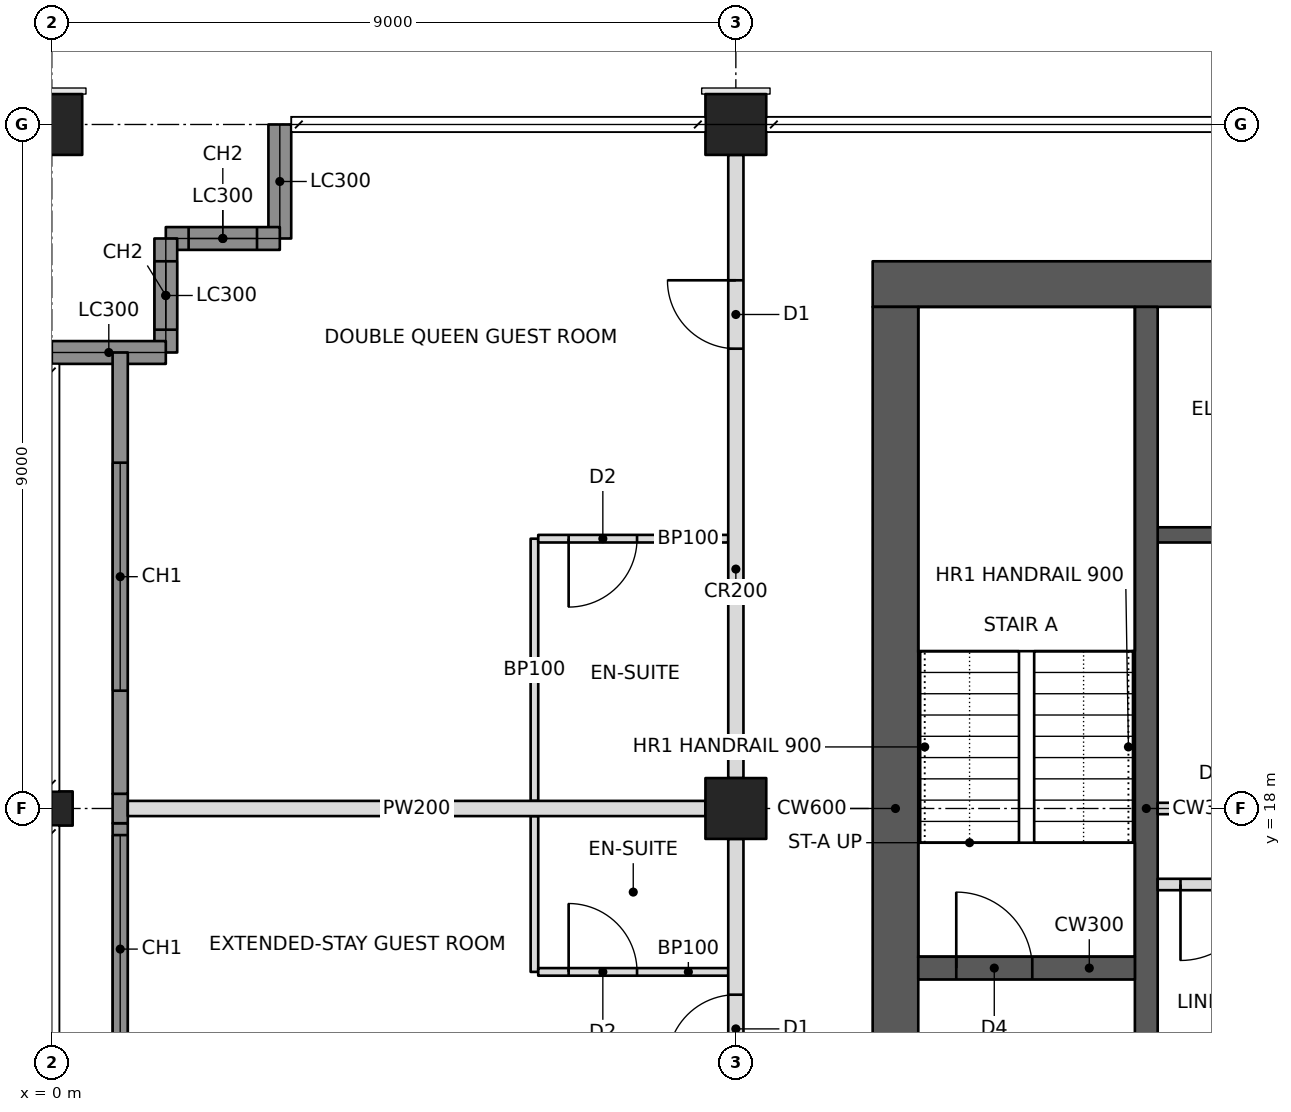
"""IFC4 building model, lengths in metres.
Left out: names, types, materials, properties, quantities, classifications, styles, units other than length and angle.
Written with IfcOpenShell. Run it as: python <this file> out.ifc"""

import sys

from ifc_helpers import new_model, si_unit, direction, frame, frame_2d, origin, origin_2d, place, context, subcontext, project, spatial, rectangle, hollow_rectangle, i_section, extrude, element, fill, save


model = new_model("IFC4")
c1 = context("Model", 3, precision=1e-05, world=origin(), true_north=direction((0.0, 1.0)))
c2 = subcontext(c1, "Body", "Model", "MODEL_VIEW")
j1 = project(units=[si_unit("LENGTHUNIT", "METRE"), si_unit("PLANEANGLEUNIT", "RADIAN")], contexts=[c1])
p1 = place(None, origin())
s1 = spatial("IfcSite", under=j1, at=p1, CompositionType="ELEMENT")
p2 = place(p1, origin())
s2 = spatial("IfcBuilding", under=s1, at=p2, CompositionType="ELEMENT")
p3 = place(p2, frame((0.0, 0.0, 167.2)))
s3 = spatial("IfcBuildingStorey", under=s2, at=p3, CompositionType="ELEMENT", Elevation=167.2)
p4 = place(p3, frame((0.0, 18.0, 0.0), z_axis=(0.0, 0.0, 1.0), x_axis=(0.0, 1.0, 0.0)))
e1 = element("IfcColumn", 1, at=p4, inside=s3, PredefinedType="COLUMN", context=c2, shape_type="SweptSolid", body=[
    extrude(i_section(OverallWidth=0.449, OverallDepth=0.549, WebThickness=0.072, FlangeThickness=0.115, at=origin_2d()), origin(), (0.0, 0.0, 1.0), 3.4),
])
p5 = place(p3, frame((0.0, 27.0, 0.0), z_axis=(0.0, 0.0, 1.0), x_axis=(0.0, 1.0, 0.0)))
e2 = element("IfcColumn", 2, at=p5, inside=s3, PredefinedType="COLUMN", context=c2, shape_type="SweptSolid", body=[
    extrude(hollow_rectangle(XDim=0.8, YDim=0.8, WallThickness=0.07, at=origin_2d()), origin(), (0.0, 0.0, 1.0), 3.4),
])
p6 = place(p3, frame((9.0, 18.0, 0.0), z_axis=(0.0, 0.0, 1.0), x_axis=(1.0, 0.0, 0.0)))
e3 = element("IfcColumn", 3, at=p6, inside=s3, PredefinedType="COLUMN", context=c2, shape_type="SweptSolid", body=[
    extrude(hollow_rectangle(XDim=0.8, YDim=0.8, WallThickness=0.06, at=origin_2d()), origin(), (0.0, 0.0, 1.0), 3.4),
])
p7 = place(p3, frame((9.0, 27.0, 0.0), z_axis=(0.0, 0.0, 1.0), x_axis=(1.0, 0.0, 0.0)))
e4 = element("IfcColumn", 4, at=p7, inside=s3, PredefinedType="COLUMN", context=c2, shape_type="SweptSolid", body=[
    extrude(hollow_rectangle(XDim=0.8, YDim=0.8, WallThickness=0.07, at=origin_2d()), origin(), (0.0, 0.0, 1.0), 3.4),
])
p8 = place(p3, frame((10.8, 24.9, 0.0), z_axis=(0.0, 0.0, 1.0), x_axis=(1.0, 0.0, 0.0)))
e5 = element("IfcWall", 5, at=p8, inside=s3, PredefinedType="SHEAR", context=c2, shape_type="SweptSolid", body=[
    extrude(rectangle(XDim=23.4, YDim=0.6, at=frame_2d((11.7, 0.0))), origin(), (0.0, 0.0, 1.0), 3.4),
])
p9 = place(p8, frame((17.2, 0.0, 0.0)))
e6 = element("IfcOpeningElement", 6, at=p9, cuts=e5, PredefinedType="OPENING", context=c2, shape_type="SweptSolid", body=[
    extrude(rectangle(XDim=1.8, YDim=2.1, at=frame_2d((0.9, 1.05))), frame((0.0, 0.31, 0.0), z_axis=(0.0, -1.0, 0.0), x_axis=(1.0, 0.0, 0.0)), (0.0, 0.0, 1.0), 0.62),
])
p10 = place(p8, frame((21.1, 0.0, 0.0)))
e7 = element("IfcOpeningElement", 7, at=p10, cuts=e5, PredefinedType="OPENING", context=c2, shape_type="SweptSolid", body=[
    extrude(rectangle(XDim=1.0, YDim=2.1, at=frame_2d((0.5, 1.05))), frame((0.0, 0.31, 0.0), z_axis=(0.0, -1.0, 0.0), x_axis=(1.0, 0.0, 0.0)), (0.0, 0.0, 1.0), 0.62),
])
p11 = place(p8, frame((4.9, 0.0, 0.0)))
e8 = element("IfcOpeningElement", 8, at=p11, cuts=e5, PredefinedType="OPENING", context=c2, shape_type="SweptSolid", body=[
    extrude(rectangle(XDim=1.0, YDim=2.1, at=frame_2d((0.5, 1.05))), frame((0.0, 0.31, 0.0), z_axis=(0.0, -1.0, 0.0), x_axis=(1.0, 0.0, 0.0)), (0.0, 0.0, 1.0), 0.62),
])
p12 = place(p3, frame((11.1, 11.4, 0.0), z_axis=(0.0, 0.0, 1.0), x_axis=(0.0, 1.0, 0.0)))
e9 = element("IfcWall", 9, at=p12, inside=s3, PredefinedType="SHEAR", context=c2, shape_type="SweptSolid", body=[
    extrude(rectangle(XDim=13.2, YDim=0.6, at=frame_2d((6.6, 0.0))), origin(), (0.0, 0.0, 1.0), 3.4),
])
p13 = place(p3, frame((14.4, 11.4, 0.0), z_axis=(0.0, 0.0, 1.0), x_axis=(0.0, 1.0, 0.0)))
e10 = element("IfcWall", 10, at=p13, inside=s3, PredefinedType="SHEAR", context=c2, shape_type="SweptSolid", body=[
    extrude(rectangle(XDim=13.2, YDim=0.3, at=frame_2d((6.6, 0.0))), origin(), (0.0, 0.0, 1.0), 3.4),
])
p14 = place(p3, frame((11.4, 15.9, 0.0), z_axis=(0.0, 0.0, 1.0), x_axis=(1.0, 0.0, 0.0)))
e11 = element("IfcWall", 11, at=p14, inside=s3, PredefinedType="SHEAR", context=c2, shape_type="SweptSolid", body=[
    extrude(rectangle(XDim=2.85, YDim=0.3, at=frame_2d((1.425, 0.0))), origin(), (0.0, 0.0, 1.0), 3.4),
])
p15 = place(p14, frame((0.5, 0.0, 0.0)))
e12 = element("IfcOpeningElement", 12, at=p15, cuts=e11, PredefinedType="OPENING", context=c2, shape_type="SweptSolid", body=[
    extrude(rectangle(XDim=1.0, YDim=2.1, at=frame_2d((0.5, 1.05))), frame((0.0, 0.16, 0.0), z_axis=(0.0, -1.0, 0.0), x_axis=(1.0, 0.0, 0.0)), (0.0, 0.0, 1.0), 0.32),
])
p16 = place(p3, frame((14.55, 18.0, 0.0), z_axis=(0.0, 0.0, 1.0), x_axis=(1.0, 0.0, 0.0)))
e13 = element("IfcWall", 13, at=p16, inside=s3, PredefinedType="PARTITIONING", context=c2, shape_type="SweptSolid", body=[
    extrude(rectangle(XDim=3.3, YDim=0.15, at=frame_2d((1.65, 0.0))), origin(), (0.0, 0.0, 1.0), 3.2),
])
p17 = place(p3, frame((14.55, 21.6, 0.0), z_axis=(0.0, 0.0, 1.0), x_axis=(1.0, 0.0, 0.0)))
e14 = element("IfcWall", 14, at=p17, inside=s3, PredefinedType="SHEAR", context=c2, shape_type="SweptSolid", body=[
    extrude(rectangle(XDim=3.3, YDim=0.2, at=frame_2d((1.65, 0.0))), origin(), (0.0, 0.0, 1.0), 3.4),
])
p18 = place(p3, frame((3.0, 27.0, 0.0), z_axis=(0.0, 0.0, 1.0), x_axis=(0.0, -1.0, 0.0)))
e15 = element("IfcWall", 15, at=p18, inside=s3, PredefinedType="SOLIDWALL", context=c2, shape_type="SweptSolid", body=[
    extrude(rectangle(XDim=1.5, YDim=0.3, at=frame_2d((0.75, 0.0))), origin(), (0.0, 0.0, 1.0), 2.42),
])
p19 = place(p3, frame((3.0, 25.5, 0.0), z_axis=(0.0, 0.0, 1.0), x_axis=(-1.0, 0.0, 0.0)))
e16 = element("IfcWall", 16, at=p19, inside=s3, PredefinedType="SOLIDWALL", context=c2, shape_type="SweptSolid", body=[
    extrude(rectangle(XDim=1.5, YDim=0.3, at=frame_2d((0.75, 0.0))), origin(), (0.0, 0.0, 1.0), 3.2),
])
p20 = place(p19, frame((0.3, 0.0, 0.6)))
e17 = element("IfcOpeningElement", 17, at=p20, cuts=e16, PredefinedType="OPENING", context=c2, shape_type="SweptSolid", body=[
    extrude(rectangle(XDim=0.9, YDim=2.2, at=frame_2d((0.45, 1.1))), frame((0.0, 0.16, 0.0), z_axis=(0.0, -1.0, 0.0), x_axis=(1.0, 0.0, 0.0)), (0.0, 0.0, 1.0), 0.32),
])
p21 = place(p3, frame((1.5, 25.5, 0.0), z_axis=(0.0, 0.0, 1.0), x_axis=(0.0, -1.0, 0.0)))
e18 = element("IfcWall", 18, at=p21, inside=s3, PredefinedType="SOLIDWALL", context=c2, shape_type="SweptSolid", body=[
    extrude(rectangle(XDim=1.5, YDim=0.3, at=frame_2d((0.75, 0.0))), origin(), (0.0, 0.0, 1.0), 3.2),
])
p22 = place(p21, frame((0.3, 0.0, 0.6)))
e19 = element("IfcOpeningElement", 19, at=p22, cuts=e18, PredefinedType="OPENING", context=c2, shape_type="SweptSolid", body=[
    extrude(rectangle(XDim=0.9, YDim=2.2, at=frame_2d((0.45, 1.1))), frame((0.0, 0.16, 0.0), z_axis=(0.0, -1.0, 0.0), x_axis=(1.0, 0.0, 0.0)), (0.0, 0.0, 1.0), 0.32),
])
p23 = place(p3, frame((1.5, 24.0, 0.0), z_axis=(0.0, 0.0, 1.0), x_axis=(-1.0, 0.0, 0.0)))
e20 = element("IfcWall", 20, at=p23, inside=s3, PredefinedType="SOLIDWALL", context=c2, shape_type="SweptSolid", body=[
    extrude(rectangle(XDim=1.5, YDim=0.3, at=frame_2d((0.75, 0.0))), origin(), (0.0, 0.0, 1.0), 2.42),
])
p24 = place(p3, frame((9.0, 10.8, 0.0), z_axis=(0.0, 0.0, 1.0), x_axis=(0.0, 1.0, 0.0)))
e21 = element("IfcWall", 21, at=p24, inside=s3, PredefinedType="PARTITIONING", context=c2, shape_type="SweptSolid", body=[
    extrude(rectangle(XDim=6.8, YDim=0.2, at=frame_2d((3.4, 0.0))), origin(), (0.0, 0.0, 1.0), 2.405),
])
p25 = place(p24, frame((0.25, 0.0, 0.0)))
e22 = element("IfcOpeningElement", 22, at=p25, cuts=e21, PredefinedType="OPENING", context=c2, shape_type="SweptSolid", body=[
    extrude(rectangle(XDim=0.9, YDim=2.1, at=frame_2d((0.45, 1.05))), frame((0.0, 0.11, 0.0), z_axis=(0.0, -1.0, 0.0), x_axis=(1.0, 0.0, 0.0)), (0.0, 0.0, 1.0), 0.22),
])
p26 = place(p24, frame((3.85, 0.0, 0.0)))
e23 = element("IfcOpeningElement", 23, at=p26, cuts=e21, PredefinedType="OPENING", context=c2, shape_type="SweptSolid", body=[
    extrude(rectangle(XDim=0.9, YDim=2.1, at=frame_2d((0.45, 1.05))), frame((0.0, 0.11, 0.0), z_axis=(0.0, -1.0, 0.0), x_axis=(1.0, 0.0, 0.0)), (0.0, 0.0, 1.0), 0.22),
])
p27 = place(p3, frame((9.0, 18.4, 0.0), z_axis=(0.0, 0.0, 1.0), x_axis=(0.0, 1.0, 0.0)))
e24 = element("IfcWall", 24, at=p27, inside=s3, PredefinedType="PARTITIONING", context=c2, shape_type="SweptSolid", body=[
    extrude(rectangle(XDim=8.2, YDim=0.2, at=frame_2d((4.1, 0.0))), origin(), (0.0, 0.0, 1.0), 2.405),
])
p28 = place(p27, frame((5.65, 0.0, 0.0)))
e25 = element("IfcOpeningElement", 25, at=p28, cuts=e24, PredefinedType="OPENING", context=c2, shape_type="SweptSolid", body=[
    extrude(rectangle(XDim=0.9, YDim=2.1, at=frame_2d((0.45, 1.05))), frame((0.0, 0.11, 0.0), z_axis=(0.0, -1.0, 0.0), x_axis=(1.0, 0.0, 0.0)), (0.0, 0.0, 1.0), 0.22),
])
p29 = place(p3, frame((8.6, 18.0, 0.0), z_axis=(0.0, 0.0, 1.0), x_axis=(-1.0, 0.0, 0.0)))
e26 = element("IfcWall", 26, at=p29, inside=s3, PredefinedType="PARTITIONING", context=c2, shape_type="SweptSolid", body=[
    extrude(rectangle(XDim=7.6, YDim=0.2, at=frame_2d((3.8, 0.0))), origin(), (0.0, 0.0, 1.0), 2.405),
])
p30 = place(p3, frame((6.35, 15.85, 0.0), z_axis=(0.0, 0.0, 1.0), x_axis=(0.0, 1.0, 0.0)))
e27 = element("IfcWall", 27, at=p30, inside=s3, PredefinedType="PARTITIONING", context=c2, shape_type="SweptSolid", body=[
    extrude(rectangle(XDim=2.05, YDim=0.1, at=frame_2d((1.025, 0.0))), origin(), (0.0, 0.0, 1.0), 2.404),
])
p31 = place(p3, frame((8.9, 15.85, 0.0), z_axis=(0.0, 0.0, 1.0), x_axis=(-1.0, 0.0, 0.0)))
e28 = element("IfcWall", 28, at=p31, inside=s3, PredefinedType="PARTITIONING", context=c2, shape_type="SweptSolid", body=[
    extrude(rectangle(XDim=2.5, YDim=0.1, at=frame_2d((1.25, 0.0))), origin(), (0.0, 0.0, 1.0), 2.404),
])
p32 = place(p31, frame((1.2, 0.0, 0.0)))
e29 = element("IfcOpeningElement", 29, at=p32, cuts=e28, PredefinedType="OPENING", context=c2, shape_type="SweptSolid", body=[
    extrude(rectangle(XDim=0.9, YDim=2.1, at=frame_2d((0.45, 1.05))), frame((0.0, 0.06, 0.0), z_axis=(0.0, -1.0, 0.0), x_axis=(1.0, 0.0, 0.0)), (0.0, 0.0, 1.0), 0.12),
])
p33 = place(p3, frame((6.35, 18.1, 0.0), z_axis=(0.0, 0.0, 1.0), x_axis=(0.0, 1.0, 0.0)))
e30 = element("IfcWall", 30, at=p33, inside=s3, PredefinedType="PARTITIONING", context=c2, shape_type="SweptSolid", body=[
    extrude(rectangle(XDim=3.45, YDim=0.1, at=frame_2d((1.725, 0.0))), origin(), (0.0, 0.0, 1.0), 2.404),
])
p34 = place(p3, frame((8.9, 21.55, 0.0), z_axis=(0.0, 0.0, 1.0), x_axis=(-1.0, 0.0, 0.0)))
e31 = element("IfcWall", 31, at=p34, inside=s3, PredefinedType="PARTITIONING", context=c2, shape_type="SweptSolid", body=[
    extrude(rectangle(XDim=2.5, YDim=0.1, at=frame_2d((1.25, 0.0))), origin(), (0.0, 0.0, 1.0), 2.404),
])
p35 = place(p34, frame((1.2, 0.0, 0.0)))
e32 = element("IfcOpeningElement", 32, at=p35, cuts=e31, PredefinedType="OPENING", context=c2, shape_type="SweptSolid", body=[
    extrude(rectangle(XDim=0.9, YDim=2.1, at=frame_2d((0.45, 1.05))), frame((0.0, 0.06, 0.0), z_axis=(0.0, -1.0, 0.0), x_axis=(1.0, 0.0, 0.0)), (0.0, 0.0, 1.0), 0.12),
])
p36 = place(p3, frame((14.55, 17.0, 0.0), z_axis=(0.0, 0.0, 1.0), x_axis=(1.0, 0.0, 0.0)))
e33 = element("IfcWall", 33, at=p36, inside=s3, PredefinedType="PARTITIONING", context=c2, shape_type="SweptSolid", body=[
    extrude(rectangle(XDim=3.3, YDim=0.15, at=frame_2d((1.65, 0.0))), origin(), (0.0, 0.0, 1.0), 3.2),
])
p37 = place(p36, frame((0.3, 0.0, 0.0)))
e34 = element("IfcOpeningElement", 34, at=p37, cuts=e33, PredefinedType="OPENING", context=c2, shape_type="SweptSolid", body=[
    extrude(rectangle(XDim=1.0, YDim=2.1, at=frame_2d((0.5, 1.05))), frame((0.0, 0.085, 0.0), z_axis=(0.0, -1.0, 0.0), x_axis=(1.0, 0.0, 0.0)), (0.0, 0.0, 1.0), 0.17),
])
p38 = place(p3, frame((0.9, 9.135, 0.0), z_axis=(0.0, 0.0, 1.0), x_axis=(0.0, 1.0, 0.0)))
e35 = element("IfcWall", 35, at=p38, inside=s3, PredefinedType="SOLIDWALL", context=c2, shape_type="SweptSolid", body=[
    extrude(rectangle(XDim=8.671, YDim=0.2, at=frame_2d((4.335, 0.0))), origin(), (0.0, 0.0, 1.0), 3.2),
])
p39 = place(p38, frame((2.015, 0.0, 0.6)))
e36 = element("IfcOpeningElement", 36, at=p39, cuts=e35, PredefinedType="OPENING", context=c2, shape_type="SweptSolid", body=[
    extrude(rectangle(XDim=3.0, YDim=2.2, at=frame_2d((1.5, 1.1))), frame((0.0, 0.11, 0.0), z_axis=(0.0, -1.0, 0.0), x_axis=(1.0, 0.0, 0.0)), (0.0, 0.0, 1.0), 0.22),
])
p40 = place(p38, frame((5.515, 0.0, 0.6)))
e37 = element("IfcOpeningElement", 37, at=p40, cuts=e35, PredefinedType="OPENING", context=c2, shape_type="SweptSolid", body=[
    extrude(rectangle(XDim=3.0, YDim=2.2, at=frame_2d((1.5, 1.1))), frame((0.0, 0.11, 0.0), z_axis=(0.0, -1.0, 0.0), x_axis=(1.0, 0.0, 0.0)), (0.0, 0.0, 1.0), 0.22),
])
p41 = place(p3, frame((0.9, 17.806, 0.0), z_axis=(0.0, 0.0, 1.0), x_axis=(0.0, 1.0, 0.0)))
e38 = element("IfcWall", 38, at=p41, inside=s3, PredefinedType="SOLIDWALL", context=c2, shape_type="SweptSolid", body=[
    extrude(rectangle(XDim=0.388, YDim=0.2, at=frame_2d((0.194, 0.0))), origin(), (0.0, 0.0, 1.0), 2.404),
])
p42 = place(p3, frame((0.9, 18.194, 0.0), z_axis=(0.0, 0.0, 1.0), x_axis=(0.0, 1.0, 0.0)))
e39 = element("IfcWall", 39, at=p42, inside=s3, PredefinedType="SOLIDWALL", context=c2, shape_type="SweptSolid", body=[
    extrude(rectangle(XDim=5.806, YDim=0.2, at=frame_2d((2.903, 0.0))), origin(), (0.0, 0.0, 1.0), 3.2),
])
p43 = place(p42, frame((1.356, 0.0, 0.6)))
e40 = element("IfcOpeningElement", 40, at=p43, cuts=e39, PredefinedType="OPENING", context=c2, shape_type="SweptSolid", body=[
    extrude(rectangle(XDim=3.0, YDim=2.2, at=frame_2d((1.5, 1.1))), frame((0.0, 0.11, 0.0), z_axis=(0.0, -1.0, 0.0), x_axis=(1.0, 0.0, 0.0)), (0.0, 0.0, 1.0), 0.22),
])
p44 = place(p20, origin())
e41 = element("IfcWindow", 41, at=p44, inside=s3, PartitioningType="SINGLE_PANEL", PredefinedType="WINDOW", context=c2, shape_type="SweptSolid", body=[
    extrude(rectangle(XDim=0.9, YDim=2.2, at=frame_2d((0.45, 1.1))), frame((0.0, 0.03, 0.0), z_axis=(0.0, -1.0, 0.0), x_axis=(1.0, 0.0, 0.0)), (0.0, 0.0, 1.0), 0.06),
])
fill(e17, e41)
p45 = place(p22, origin())
e42 = element("IfcWindow", 42, at=p45, inside=s3, PartitioningType="SINGLE_PANEL", PredefinedType="WINDOW", context=c2, shape_type="SweptSolid", body=[
    extrude(rectangle(XDim=0.9, YDim=2.2, at=frame_2d((0.45, 1.1))), frame((0.0, 0.03, 0.0), z_axis=(0.0, -1.0, 0.0), x_axis=(1.0, 0.0, 0.0)), (0.0, 0.0, 1.0), 0.06),
])
fill(e19, e42)
p46 = place(p40, origin())
e43 = element("IfcWindow", 43, at=p46, inside=s3, PartitioningType="TRIPLE_PANEL_VERTICAL", PredefinedType="WINDOW", context=c2, shape_type="SweptSolid", body=[
    extrude(rectangle(XDim=3.0, YDim=2.2, at=frame_2d((1.5, 1.1))), frame((0.0, 0.03, 0.0), z_axis=(0.0, -1.0, 0.0), x_axis=(1.0, 0.0, 0.0)), (0.0, 0.0, 1.0), 0.06),
])
fill(e37, e43)
p47 = place(p43, origin())
e44 = element("IfcWindow", 44, at=p47, inside=s3, PartitioningType="TRIPLE_PANEL_VERTICAL", PredefinedType="WINDOW", context=c2, shape_type="SweptSolid", body=[
    extrude(rectangle(XDim=3.0, YDim=2.2, at=frame_2d((1.5, 1.1))), frame((0.0, 0.03, 0.0), z_axis=(0.0, -1.0, 0.0), x_axis=(1.0, 0.0, 0.0)), (0.0, 0.0, 1.0), 0.06),
])
fill(e40, e44)
p48 = place(p32, frame((0.9, 0.0, 0.0), z_axis=(0.0, 0.0, 1.0), x_axis=(-1.0, 0.0, 0.0)))
e45 = element("IfcDoor", 45, at=p48, inside=s3, OperationType="SINGLE_SWING_LEFT", PredefinedType="DOOR", context=c2, shape_type="SweptSolid", body=[
    extrude(rectangle(XDim=0.9, YDim=2.1, at=frame_2d((0.45, 1.05))), frame((0.0, 0.025, 0.0), z_axis=(0.0, -1.0, 0.0), x_axis=(1.0, 0.0, 0.0)), (0.0, 0.0, 1.0), 0.05),
])
fill(e29, e45)
p49 = place(p26, origin())
e46 = element("IfcDoor", 46, at=p49, inside=s3, OperationType="SINGLE_SWING_LEFT", PredefinedType="DOOR", context=c2, shape_type="SweptSolid", body=[
    extrude(rectangle(XDim=0.9, YDim=2.1, at=frame_2d((0.45, 1.05))), frame((0.0, 0.025, 0.0), z_axis=(0.0, -1.0, 0.0), x_axis=(1.0, 0.0, 0.0)), (0.0, 0.0, 1.0), 0.05),
])
fill(e23, e46)
p50 = place(p35, origin())
e47 = element("IfcDoor", 47, at=p50, inside=s3, OperationType="SINGLE_SWING_RIGHT", PredefinedType="DOOR", context=c2, shape_type="SweptSolid", body=[
    extrude(rectangle(XDim=0.9, YDim=2.1, at=frame_2d((0.45, 1.05))), frame((0.0, 0.025, 0.0), z_axis=(0.0, -1.0, 0.0), x_axis=(1.0, 0.0, 0.0)), (0.0, 0.0, 1.0), 0.05),
])
fill(e32, e47)
p51 = place(p28, origin())
e48 = element("IfcDoor", 48, at=p51, inside=s3, OperationType="SINGLE_SWING_RIGHT", PredefinedType="DOOR", context=c2, shape_type="SweptSolid", body=[
    extrude(rectangle(XDim=0.9, YDim=2.1, at=frame_2d((0.45, 1.05))), frame((0.0, 0.025, 0.0), z_axis=(0.0, -1.0, 0.0), x_axis=(1.0, 0.0, 0.0)), (0.0, 0.0, 1.0), 0.05),
])
fill(e25, e48)
p52 = place(p37, frame((1.0, 0.0, 0.0), z_axis=(0.0, 0.0, 1.0), x_axis=(-1.0, 0.0, 0.0)))
e49 = element("IfcDoor", 49, at=p52, inside=s3, OperationType="SINGLE_SWING_RIGHT", PredefinedType="DOOR", context=c2, shape_type="SweptSolid", body=[
    extrude(rectangle(XDim=1.0, YDim=2.1, at=frame_2d((0.5, 1.05))), frame((0.0, 0.025, 0.0), z_axis=(0.0, -1.0, 0.0), x_axis=(1.0, 0.0, 0.0)), (0.0, 0.0, 1.0), 0.05),
])
fill(e34, e49)
p53 = place(p15, origin())
e50 = element("IfcDoor", 50, at=p53, inside=s3, OperationType="SINGLE_SWING_LEFT", PredefinedType="DOOR", context=c2, shape_type="SweptSolid", body=[
    extrude(rectangle(XDim=1.0, YDim=2.1, at=frame_2d((0.5, 1.05))), frame((0.0, 0.025, 0.0), z_axis=(0.0, -1.0, 0.0), x_axis=(1.0, 0.0, 0.0)), (0.0, 0.0, 1.0), 0.05),
])
fill(e12, e50)
save(model, sys.argv[1])
